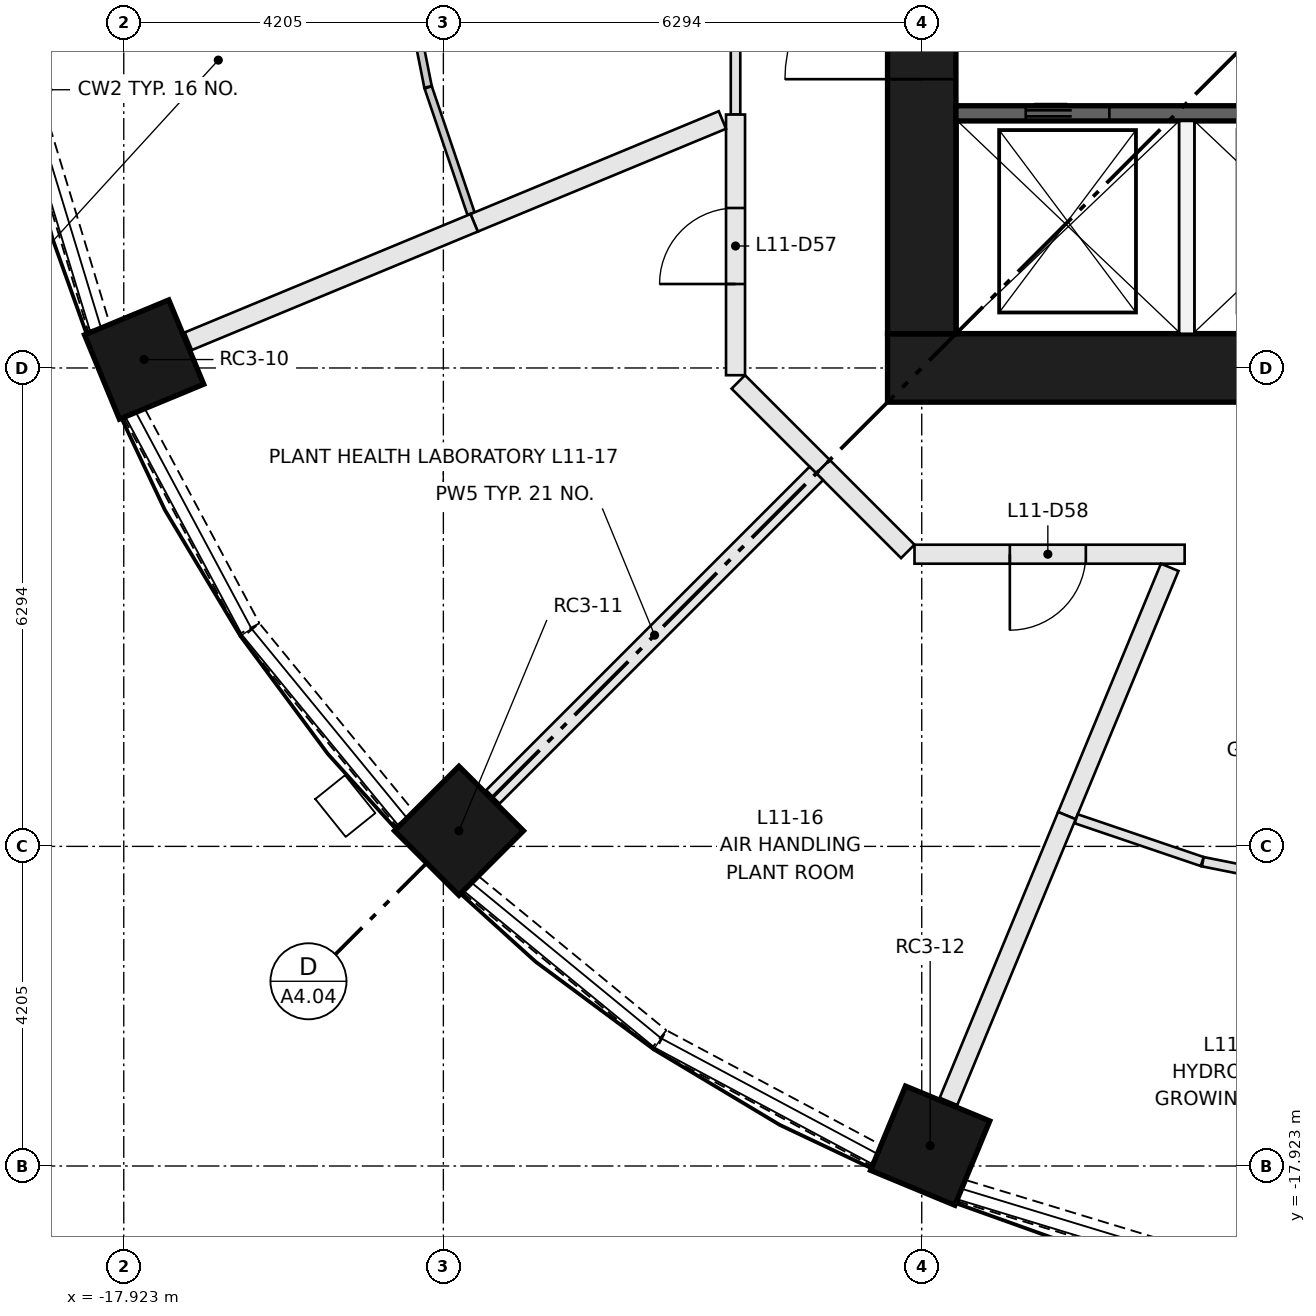
"""IFC4 building model, lengths in metres.
Left out: names, types, materials, properties, quantities, classifications, styles, units other than length and angle.
Written with IfcOpenShell. Run it as: python <this file> out.ifc"""

import sys

from ifc_helpers import new_model, si_unit, direction, frame, frame_2d, origin, origin_2d, place, context, subcontext, project, spatial, rectangle, extrude, element, fill, save


model = new_model("IFC4")
c1 = context("Model", 3, precision=1e-05, world=origin(), true_north=direction((0.0, 1.0)))
c2 = subcontext(c1, "Body", "Model", "MODEL_VIEW")
j1 = project(units=[si_unit("LENGTHUNIT", "METRE"), si_unit("PLANEANGLEUNIT", "RADIAN")], contexts=[c1])
p1 = place(None, origin())
s1 = spatial("IfcSite", under=j1, at=p1, CompositionType="ELEMENT")
p2 = place(p1, origin())
s2 = spatial("IfcBuilding", under=s1, at=p2, CompositionType="ELEMENT")
p3 = place(p2, frame((0.0, 0.0, 44.45)))
s3 = spatial("IfcBuildingStorey", under=s2, at=p3, CompositionType="ELEMENT", Elevation=44.45)
for number, where, z_axis, x_axis in (
    (1, (-17.655, -7.313, 0.0), (0.0, 0.0, 1.0), (-0.924, -0.383, 0.0)),
    (2, (-13.513, -13.513, 0.0), (0.0, 0.0, 1.0), (-0.707, -0.707, 0.0)),
    (3, (-7.313, -17.655, 0.0), (0.0, 0.0, 1.0), (-0.383, -0.924, 0.0)),
):
    element("IfcColumn", number, at=place(p3, frame(where, z_axis=z_axis, x_axis=x_axis)), inside=s3, PredefinedType="COLUMN", context=c2, shape_type="SweptSolid", body=[
        extrude(rectangle(XDim=1.2, YDim=1.2, at=origin_2d()), origin(), (0.0, 0.0, 1.0), 3.65),
    ])
p4 = place(p3, frame((-7.874, -7.424, 0.0), z_axis=(0.0, 0.0, 1.0), x_axis=(1.0, 0.0, 0.0)))
e4 = element("IfcWall", 4, at=p4, inside=s3, PredefinedType="SHEAR", context=c2, shape_type="SweptSolid", body=[
    extrude(rectangle(XDim=15.748, YDim=0.9, at=frame_2d((7.874, 0.0))), origin(), (0.0, 0.0, 1.0), 3.65),
])
p5 = place(p3, frame((-7.424, -6.974, 0.0), z_axis=(0.0, 0.0, 1.0), x_axis=(0.0, 1.0, 0.0)))
e5 = element("IfcWall", 5, at=p5, inside=s3, PredefinedType="SHEAR", context=c2, shape_type="SweptSolid", body=[
    extrude(rectangle(XDim=13.948, YDim=0.9, at=frame_2d((6.974, 0.0))), origin(), (0.0, 0.0, 1.0), 3.65),
])
p6 = place(p5, frame((6.474, 0.0, 0.0)))
e6 = element("IfcOpeningElement", 6, at=p6, cuts=e5, PredefinedType="OPENING", context=c2, shape_type="SweptSolid", body=[
    extrude(rectangle(XDim=1.0, YDim=2.1, at=frame_2d((0.5, 1.05))), frame((0.0, 0.46, 0.0), z_axis=(0.0, -1.0, 0.0), x_axis=(1.0, 0.0, 0.0)), (0.0, 0.0, 1.0), 0.92),
])
p7 = place(p5, frame((3.35, 0.0, 0.0)))
e7 = element("IfcOpeningElement", 7, at=p7, cuts=e5, PredefinedType="OPENING", context=c2, shape_type="SweptSolid", body=[
    extrude(rectangle(XDim=1.8, YDim=2.1, at=frame_2d((0.9, 1.05))), frame((0.0, 0.46, 0.0), z_axis=(0.0, -1.0, 0.0), x_axis=(1.0, 0.0, 0.0)), (0.0, 0.0, 1.0), 0.92),
])
p8 = place(p5, frame((8.799, 0.0, 0.0)))
e8 = element("IfcOpeningElement", 8, at=p8, cuts=e5, PredefinedType="OPENING", context=c2, shape_type="SweptSolid", body=[
    extrude(rectangle(XDim=1.8, YDim=2.1, at=frame_2d((0.9, 1.05))), frame((0.0, 0.46, 0.0), z_axis=(0.0, -1.0, 0.0), x_axis=(1.0, 0.0, 0.0)), (0.0, 0.0, 1.0), 0.92),
])
p9 = place(p5, frame((11.974, 0.0, 0.0)))
e9 = element("IfcOpeningElement", 9, at=p9, cuts=e5, PredefinedType="OPENING", context=c2, shape_type="SweptSolid", body=[
    extrude(rectangle(XDim=1.0, YDim=2.1, at=frame_2d((0.5, 1.05))), frame((0.0, 0.46, 0.0), z_axis=(0.0, -1.0, 0.0), x_axis=(1.0, 0.0, 0.0)), (0.0, 0.0, 1.0), 0.92),
])
p10 = place(p3, frame((-6.974, -4.074, 0.0), z_axis=(0.0, 0.0, 1.0), x_axis=(1.0, 0.0, 0.0)))
e10 = element("IfcWall", 10, at=p10, inside=s3, PredefinedType="SHEAR", context=c2, shape_type="SweptSolid", body=[
    extrude(rectangle(XDim=13.948, YDim=0.2, at=frame_2d((6.974, 0.0))), origin(), (0.0, 0.0, 1.0), 3.3),
])
p11 = place(p10, frame((0.918, 0.0, 0.0)))
e11 = element("IfcOpeningElement", 11, at=p11, cuts=e10, PredefinedType="OPENING", context=c2, shape_type="SweptSolid", body=[
    extrude(rectangle(XDim=1.1, YDim=2.1, at=frame_2d((0.55, 1.05))), frame((0.0, 0.11, 0.0), z_axis=(0.0, -1.0, 0.0), x_axis=(1.0, 0.0, 0.0)), (0.0, 0.0, 1.0), 0.22),
])
p12 = place(p10, frame((4.055, 0.0, 0.0)))
e12 = element("IfcOpeningElement", 12, at=p12, cuts=e10, PredefinedType="OPENING", context=c2, shape_type="SweptSolid", body=[
    extrude(rectangle(XDim=1.1, YDim=2.1, at=frame_2d((0.55, 1.05))), frame((0.0, 0.11, 0.0), z_axis=(0.0, -1.0, 0.0), x_axis=(1.0, 0.0, 0.0)), (0.0, 0.0, 1.0), 0.22),
])
p13 = place(p10, frame((6.658, 0.0, 0.0)))
e13 = element("IfcOpeningElement", 13, at=p13, cuts=e10, PredefinedType="OPENING", context=c2, shape_type="SweptSolid", body=[
    extrude(rectangle(XDim=1.0, YDim=2.1, at=frame_2d((0.5, 1.05))), frame((0.0, 0.11, 0.0), z_axis=(0.0, -1.0, 0.0), x_axis=(1.0, 0.0, 0.0)), (0.0, 0.0, 1.0), 0.22),
])
p14 = place(p10, frame((8.627, 0.0, 0.0)))
e14 = element("IfcOpeningElement", 14, at=p14, cuts=e10, PredefinedType="OPENING", context=c2, shape_type="SweptSolid", body=[
    extrude(rectangle(XDim=1.0, YDim=2.1, at=frame_2d((0.5, 1.05))), frame((0.0, 0.11, 0.0), z_axis=(0.0, -1.0, 0.0), x_axis=(1.0, 0.0, 0.0)), (0.0, 0.0, 1.0), 0.22),
])
p15 = place(p10, frame((10.595, 0.0, 0.0)))
e15 = element("IfcOpeningElement", 15, at=p15, cuts=e10, PredefinedType="OPENING", context=c2, shape_type="SweptSolid", body=[
    extrude(rectangle(XDim=1.0, YDim=2.1, at=frame_2d((0.5, 1.05))), frame((0.0, 0.11, 0.0), z_axis=(0.0, -1.0, 0.0), x_axis=(1.0, 0.0, 0.0)), (0.0, 0.0, 1.0), 0.22),
])
p16 = place(p10, frame((12.564, 0.0, 0.0)))
e16 = element("IfcOpeningElement", 16, at=p16, cuts=e10, PredefinedType="OPENING", context=c2, shape_type="SweptSolid", body=[
    extrude(rectangle(XDim=1.0, YDim=2.1, at=frame_2d((0.5, 1.05))), frame((0.0, 0.11, 0.0), z_axis=(0.0, -1.0, 0.0), x_axis=(1.0, 0.0, 0.0)), (0.0, 0.0, 1.0), 0.22),
])
p17 = place(p3, frame((-3.937, -6.974, 0.0), z_axis=(0.0, 0.0, 1.0), x_axis=(0.0, 1.0, 0.0)))
e17 = element("IfcWall", 17, at=p17, inside=s3, PredefinedType="PARTITIONING", context=c2, shape_type="SweptSolid", body=[
    extrude(rectangle(XDim=2.8, YDim=0.2, at=frame_2d((1.4, 0.0))), origin(), (0.0, 0.0, 1.0), 3.3),
])
p18 = place(p3, frame((-19.18, -3.83, 0.0), z_axis=(0.0, 0.0, 1.0), x_axis=(0.290472877795, -0.956883225512, 0.0)))
e18 = element("IfcWall", 18, at=p18, inside=s3, PredefinedType="SOLIDWALL", context=c2, shape_type="SweptSolid", body=[
    extrude(rectangle(XDim=3.202, YDim=0.3, at=frame_2d((1.601, 0.0))), origin(), (0.0, 0.0, 1.0), 0.9),
])
p19 = place(p3, frame((-17.78, -8.028, 0.0), z_axis=(0.0, 0.0, 1.0), x_axis=(0.471284265614, -0.881981372243, 0.0)))
e19 = element("IfcWall", 19, at=p19, inside=s3, PredefinedType="SOLIDWALL", context=c2, shape_type="SweptSolid", body=[
    extrude(rectangle(XDim=3.204, YDim=0.3, at=frame_2d((1.602, 0.0))), origin(), (0.0, 0.0, 1.0), 0.9),
])
for number, where, z_axis, x_axis in (
    (20, (-16.253, -10.879, 0.0), (0.0, 0.0, 1.0), (0.634, -0.773, 0.0)),
    (21, (-13.354, -14.222, 0.0), (0.0, 0.0, 1.0), (0.773, -0.634, 0.0)),
):
    element("IfcWall", number, at=place(p3, frame(where, z_axis=z_axis, x_axis=x_axis)), inside=s3, PredefinedType="SOLIDWALL", context=c2, shape_type="SweptSolid", body=[
        extrude(rectangle(XDim=3.202, YDim=0.3, at=frame_2d((1.601, 0.0))), origin(), (0.0, 0.0, 1.0), 0.9),
    ])
p20 = place(p3, frame((-10.854, -16.27, 0.0), z_axis=(0.0, 0.0, 1.0), x_axis=(0.881981372243, -0.471284265614, 0.0)))
e22 = element("IfcWall", 22, at=p20, inside=s3, PredefinedType="SOLIDWALL", context=c2, shape_type="SweptSolid", body=[
    extrude(rectangle(XDim=3.204, YDim=0.3, at=frame_2d((1.602, 0.0))), origin(), (0.0, 0.0, 1.0), 0.9),
])
p21 = place(p3, frame((-6.895, -18.25, 0.0), z_axis=(0.0, 0.0, 1.0), x_axis=(0.956883225512, -0.290472877795, 0.0)))
e23 = element("IfcWall", 23, at=p21, inside=s3, PredefinedType="SOLIDWALL", context=c2, shape_type="SweptSolid", body=[
    extrude(rectangle(XDim=3.202, YDim=0.3, at=frame_2d((1.601, 0.0))), origin(), (0.0, 0.0, 1.0), 0.9),
])
p22 = place(p3, frame((-9.874, -4.09, 0.0), z_axis=(0.0, 0.0, 1.0), x_axis=(0.0, 1.0, 0.0)))
e24 = element("IfcWall", 24, at=p22, inside=s3, PredefinedType="PARTITIONING", context=c2, shape_type="SweptSolid", body=[
    extrude(rectangle(XDim=8.18, YDim=0.125, at=frame_2d((4.09, 0.0))), origin(), (0.0, 0.0, 1.0), 3.3),
])
p23 = place(p22, frame((3.6, 0.0, 0.0)))
e25 = element("IfcOpeningElement", 25, at=p23, cuts=e24, PredefinedType="OPENING", context=c2, shape_type="SweptSolid", body=[
    extrude(rectangle(XDim=1.0, YDim=2.1, at=frame_2d((0.5, 1.05))), frame((0.0, 0.073, 0.0), z_axis=(0.0, -1.0, 0.0), x_axis=(1.0, 0.0, 0.0)), (0.0, 0.0, 1.0), 0.145),
])
p24 = place(p3, frame((-9.874, -7.519, 0.0), z_axis=(0.0, 0.0, 1.0), x_axis=(0.0, 1.0, 0.0)))
e26 = element("IfcWall", 26, at=p24, inside=s3, PredefinedType="PARTITIONING", context=c2, shape_type="SweptSolid", body=[
    extrude(rectangle(XDim=3.429, YDim=0.25, at=frame_2d((1.715, 0.0))), origin(), (0.0, 0.0, 1.0), 3.3),
])
p25 = place(p24, frame((1.2, 0.0, 0.0)))
e27 = element("IfcOpeningElement", 27, at=p25, cuts=e26, PredefinedType="OPENING", context=c2, shape_type="SweptSolid", body=[
    extrude(rectangle(XDim=1.0, YDim=2.1, at=frame_2d((0.5, 1.05))), frame((0.0, 0.135, 0.0), z_axis=(0.0, -1.0, 0.0), x_axis=(1.0, 0.0, 0.0)), (0.0, 0.0, 1.0), 0.27),
])
for number, where, z_axis, x_axis in (
    (28, (-8.722, -8.722, 0.0), (0.0, 0.0, 1.0), (-0.707, 0.707, 0.0)),
    (29, (-7.608, -9.837, 0.0), (0.0, 0.0, 1.0), (-0.707, 0.707, 0.0)),
):
    element("IfcWall", number, at=place(p3, frame(where, z_axis=z_axis, x_axis=x_axis)), inside=s3, PredefinedType="PARTITIONING", context=c2, shape_type="SweptSolid", body=[
        extrude(rectangle(XDim=1.577, YDim=0.25, at=frame_2d((0.788, 0.0))), origin(), (0.0, 0.0, 1.0), 3.3),
    ])
p26 = place(p3, frame((-3.965, -9.874, 0.0), z_axis=(0.0, 0.0, 1.0), x_axis=(-1.0, 0.0, 0.0)))
e30 = element("IfcWall", 30, at=p26, inside=s3, PredefinedType="PARTITIONING", context=c2, shape_type="SweptSolid", body=[
    extrude(rectangle(XDim=3.554, YDim=0.25, at=frame_2d((1.777, 0.0))), origin(), (0.0, 0.0, 1.0), 3.3),
])
p27 = place(p26, frame((1.3, 0.0, 0.0)))
e31 = element("IfcOpeningElement", 31, at=p27, cuts=e30, PredefinedType="OPENING", context=c2, shape_type="SweptSolid", body=[
    extrude(rectangle(XDim=1.0, YDim=2.1, at=frame_2d((0.5, 1.05))), frame((0.0, 0.135, 0.0), z_axis=(0.0, -1.0, 0.0), x_axis=(1.0, 0.0, 0.0)), (0.0, 0.0, 1.0), 0.27),
])
p28 = place(p3, frame((-13.92, -3.726, 0.0), z_axis=(0.0, 0.0, 1.0), x_axis=(-0.195091231684, 0.980785099459, 0.0)))
e32 = element("IfcWall", 32, at=p28, inside=s3, PredefinedType="PARTITIONING", context=c2, shape_type="SweptSolid", body=[
    extrude(rectangle(XDim=1.878, YDim=0.1, at=frame_2d((0.939, 0.0))), origin(), (0.0, 0.0, 1.0), 3.3),
])
p29 = place(p3, frame((-13.354, -5.393, 0.0), z_axis=(0.0, 0.0, 1.0), x_axis=(-0.321445771201, 0.946927988908, 0.0)))
e33 = element("IfcWall", 33, at=p29, inside=s3, PredefinedType="PARTITIONING", context=c2, shape_type="SweptSolid", body=[
    extrude(rectangle(XDim=1.753, YDim=0.1, at=frame_2d((0.876, 0.0))), origin(), (0.0, 0.0, 1.0), 3.3),
])
p30 = place(p3, frame((-10.047, -4.162, 0.0), z_axis=(0.0, 0.0, 1.0), x_axis=(-0.92388805455, -0.382662857696, 0.0)))
e34 = element("IfcWall", 34, at=p30, inside=s3, PredefinedType="PARTITIONING", context=c2, shape_type="SweptSolid", body=[
    extrude(rectangle(XDim=3.535, YDim=0.25, at=frame_2d((1.768, 0.0))), origin(), (0.0, 0.0, 1.0), 3.3),
])
p31 = place(p3, frame((-13.313, -5.514, 0.0), z_axis=(0.0, 0.0, 1.0), x_axis=(-0.923873536763, -0.382697907061, 0.0)))
e35 = element("IfcWall", 35, at=p31, inside=s3, PredefinedType="PARTITIONING", context=c2, shape_type="SweptSolid", body=[
    extrude(rectangle(XDim=4.07, YDim=0.25, at=frame_2d((2.035, 0.0))), origin(), (0.0, 0.0, 1.0), 3.3),
])
p32 = place(p3, frame((-13.067, -13.067, 0.0), z_axis=(0.0, 0.0, 1.0), x_axis=(0.707106781187, 0.707106781187, 0.0)))
e36 = element("IfcWall", 36, at=p32, inside=s3, PredefinedType="PARTITIONING", context=c2, shape_type="SweptSolid", body=[
    extrude(rectangle(XDim=6.02, YDim=0.25, at=frame_2d((3.01, 0.0))), origin(), (0.0, 0.0, 1.0), 3.3),
])
p33 = place(p3, frame((-4.162, -10.047, 0.0), z_axis=(0.0, 0.0, 1.0), x_axis=(-0.382662857696, -0.92388805455, 0.0)))
e37 = element("IfcWall", 37, at=p33, inside=s3, PredefinedType="PARTITIONING", context=c2, shape_type="SweptSolid", body=[
    extrude(rectangle(XDim=3.535, YDim=0.25, at=frame_2d((1.768, 0.0))), origin(), (0.0, 0.0, 1.0), 3.3),
])
p34 = place(p3, frame((-5.514, -13.313, 0.0), z_axis=(0.0, 0.0, 1.0), x_axis=(-0.382697907061, -0.923873536763, 0.0)))
e38 = element("IfcWall", 38, at=p34, inside=s3, PredefinedType="PARTITIONING", context=c2, shape_type="SweptSolid", body=[
    extrude(rectangle(XDim=4.07, YDim=0.25, at=frame_2d((2.035, 0.0))), origin(), (0.0, 0.0, 1.0), 3.3),
])
p35 = place(p3, frame((-3.733, -13.918, 0.0), z_axis=(0.0, 0.0, 1.0), x_axis=(-0.946926428718, 0.321450367234, 0.0)))
e39 = element("IfcWall", 39, at=p35, inside=s3, PredefinedType="PARTITIONING", context=c2, shape_type="SweptSolid", body=[
    extrude(rectangle(XDim=1.751, YDim=0.125, at=frame_2d((0.876, 0.0))), origin(), (0.0, 0.0, 1.0), 3.3),
])
p36 = place(p3, frame((-1.885, -14.286, 0.0), z_axis=(0.0, 0.0, 1.0), x_axis=(-0.980800221705, 0.19501519198, 0.0)))
e40 = element("IfcWall", 40, at=p36, inside=s3, PredefinedType="PARTITIONING", context=c2, shape_type="SweptSolid", body=[
    extrude(rectangle(XDim=1.877, YDim=0.125, at=frame_2d((0.938, 0.0))), origin(), (0.0, 0.0, 1.0), 3.3),
])
p37 = place(p11, origin())
e41 = element("IfcDoor", 41, at=p37, inside=s3, OperationType="DOUBLE_DOOR_SLIDING", PredefinedType="DOOR", context=c2, shape_type="SweptSolid", body=[
    extrude(rectangle(XDim=1.1, YDim=2.1, at=frame_2d((0.55, 1.05))), frame((0.0, 0.025, 0.0), z_axis=(0.0, -1.0, 0.0), x_axis=(1.0, 0.0, 0.0)), (0.0, 0.0, 1.0), 0.05),
])
fill(e11, e41)
p38 = place(p7, origin())
e42 = element("IfcDoor", 42, at=p38, inside=s3, OperationType="DOUBLE_DOOR_SINGLE_SWING", PredefinedType="DOOR", context=c2, shape_type="SweptSolid", body=[
    extrude(rectangle(XDim=1.8, YDim=2.1, at=frame_2d((0.9, 1.05))), frame((0.0, 0.025, 0.0), z_axis=(0.0, -1.0, 0.0), x_axis=(1.0, 0.0, 0.0)), (0.0, 0.0, 1.0), 0.05),
])
fill(e7, e42)
p39 = place(p25, origin())
e43 = element("IfcDoor", 43, at=p39, inside=s3, OperationType="SINGLE_SWING_LEFT", PredefinedType="DOOR", context=c2, shape_type="SweptSolid", body=[
    extrude(rectangle(XDim=1.0, YDim=2.1, at=frame_2d((0.5, 1.05))), frame((0.0, 0.025, 0.0), z_axis=(0.0, -1.0, 0.0), x_axis=(1.0, 0.0, 0.0)), (0.0, 0.0, 1.0), 0.05),
])
fill(e27, e43)
p40 = place(p27, origin())
e44 = element("IfcDoor", 44, at=p40, inside=s3, OperationType="SINGLE_SWING_RIGHT", PredefinedType="DOOR", context=c2, shape_type="SweptSolid", body=[
    extrude(rectangle(XDim=1.0, YDim=2.1, at=frame_2d((0.5, 1.05))), frame((0.0, 0.025, 0.0), z_axis=(0.0, -1.0, 0.0), x_axis=(1.0, 0.0, 0.0)), (0.0, 0.0, 1.0), 0.05),
])
fill(e31, e44)
save(model, sys.argv[1])
